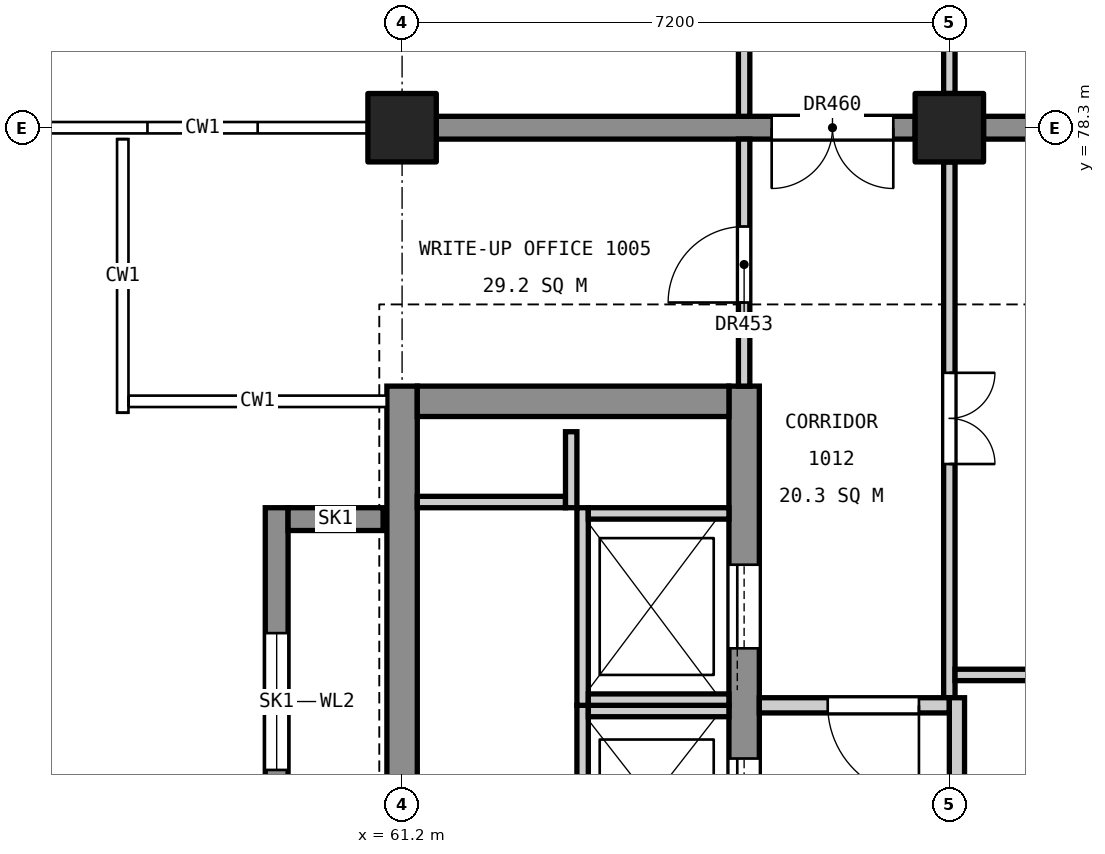
"""IFC4 building model, lengths in metres.
Left out: names, types, materials, properties, quantities, classifications, styles, units other than length and angle.
Written with IfcOpenShell. Run it as: python <this file> out.ifc"""

import sys

from ifc_helpers import new_model, si_unit, direction, frame, frame_2d, origin, origin_2d, place, context, subcontext, project, spatial, rectangle, extrude, element, fill, save


model = new_model("IFC4")
c1 = context("Model", 3, precision=1e-05, world=origin(), true_north=direction((0.0, 1.0)))
c2 = subcontext(c1, "Body", "Model", "MODEL_VIEW")
j1 = project(units=[si_unit("LENGTHUNIT", "METRE"), si_unit("PLANEANGLEUNIT", "RADIAN")], contexts=[c1])
p1 = place(None, origin())
s1 = spatial("IfcSite", under=j1, at=p1, CompositionType="ELEMENT")
p2 = place(p1, origin())
s2 = spatial("IfcBuilding", under=s1, at=p2, CompositionType="ELEMENT")
p3 = place(p2, frame((0.0, 0.0, 51.0)))
s3 = spatial("IfcBuildingStorey", under=s2, at=p3, CompositionType="ELEMENT", Elevation=51.0)
for number, where, z_axis, x_axis in (
    (1, (61.2, 78.3, 0.0), (0.0, 0.0, 1.0), (1.0, 0.0, 0.0)),
    (2, (68.4, 78.3, 0.0), (0.0, 0.0, 1.0), (1.0, 0.0, 0.0)),
):
    element("IfcColumn", number, at=place(p3, frame(where, z_axis=z_axis, x_axis=x_axis)), inside=s3, PredefinedType="COLUMN", context=c2, shape_type="SweptSolid", body=[
        extrude(rectangle(XDim=0.9, YDim=0.9, at=origin_2d()), origin(), (0.0, 0.0, 1.0), 4.8),
    ])
p4 = place(p3, frame((61.2, 60.1, 0.0), z_axis=(0.0, 0.0, 1.0), x_axis=(0.0, 1.0, 0.0)))
e3 = element("IfcWall", 3, at=p4, inside=s3, PredefinedType="SHEAR", context=c2, shape_type="SweptSolid", body=[
    extrude(rectangle(XDim=14.8, YDim=0.4, at=frame_2d((7.4, 0.0))), origin(), (0.0, 0.0, 1.0), 4.55),
])
p5 = place(p4, frame((6.11, 0.0, 3.4)))
e4 = element("IfcOpeningElement", 4, at=p5, cuts=e3, PredefinedType="OPENING", context=c2, shape_type="SweptSolid", body=[
    extrude(rectangle(XDim=1.2, YDim=0.9, at=frame_2d((0.6, 0.45))), frame((0.0, 0.21, 0.0), z_axis=(0.0, -1.0, 0.0), x_axis=(1.0, 0.0, 0.0)), (0.0, 0.0, 1.0), 0.42),
])
p6 = place(p3, frame((65.7, 60.1, 0.0), z_axis=(0.0, 0.0, 1.0), x_axis=(0.0, 1.0, 0.0)))
e5 = element("IfcWall", 5, at=p6, inside=s3, PredefinedType="SHEAR", context=c2, shape_type="SweptSolid", body=[
    extrude(rectangle(XDim=14.8, YDim=0.4, at=frame_2d((7.4, 0.0))), origin(), (0.0, 0.0, 1.0), 4.55),
])
p7 = place(p6, frame((0.5, 0.0, 0.0)))
e6 = element("IfcOpeningElement", 6, at=p7, cuts=e5, PredefinedType="OPENING", context=c2, shape_type="SweptSolid", body=[
    extrude(rectangle(XDim=1.4, YDim=2.1, at=frame_2d((0.7, 1.05))), frame((0.0, 0.21, 0.0), z_axis=(0.0, -1.0, 0.0), x_axis=(1.0, 0.0, 0.0)), (0.0, 0.0, 1.0), 0.42),
])
p8 = place(p6, frame((8.8, 0.0, 0.0)))
e7 = element("IfcOpeningElement", 7, at=p8, cuts=e5, PredefinedType="OPENING", context=c2, shape_type="SweptSolid", body=[
    extrude(rectangle(XDim=1.1, YDim=2.1, at=frame_2d((0.55, 1.05))), frame((0.0, 0.21, 0.0), z_axis=(0.0, -1.0, 0.0), x_axis=(1.0, 0.0, 0.0)), (0.0, 0.0, 1.0), 0.42),
])
p9 = place(p6, frame((11.35, 0.0, 0.0)))
e8 = element("IfcOpeningElement", 8, at=p9, cuts=e5, PredefinedType="OPENING", context=c2, shape_type="SweptSolid", body=[
    extrude(rectangle(XDim=1.1, YDim=2.1, at=frame_2d((0.55, 1.05))), frame((0.0, 0.21, 0.0), z_axis=(0.0, -1.0, 0.0), x_axis=(1.0, 0.0, 0.0)), (0.0, 0.0, 1.0), 0.42),
])
p10 = place(p3, frame((61.4, 74.7, 0.0), z_axis=(0.0, 0.0, 1.0), x_axis=(1.0, 0.0, 0.0)))
e9 = element("IfcWall", 9, at=p10, inside=s3, PredefinedType="SHEAR", context=c2, shape_type="SweptSolid", body=[
    extrude(rectangle(XDim=4.1, YDim=0.4, at=frame_2d((2.05, 0.0))), origin(), (0.0, 0.0, 1.0), 4.55),
])
p11 = place(p3, frame((59.55, 68.2, 0.0), z_axis=(0.0, 0.0, 1.0), x_axis=(0.0, 1.0, 0.0)))
e10 = element("IfcWall", 10, at=p11, inside=s3, PredefinedType="SHEAR", context=c2, shape_type="SweptSolid", body=[
    extrude(rectangle(XDim=5.1, YDim=0.3, at=frame_2d((2.55, 0.0))), origin(), (0.0, 0.0, 1.0), 4.8),
])
p12 = place(p11, frame((1.65, 0.0, 3.0)))
e11 = element("IfcOpeningElement", 11, at=p12, cuts=e10, PredefinedType="OPENING", context=c2, shape_type="SweptSolid", body=[
    extrude(rectangle(XDim=1.8, YDim=1.2, at=frame_2d((0.9, 0.6))), frame((0.0, 0.16, 0.0), z_axis=(0.0, -1.0, 0.0), x_axis=(1.0, 0.0, 0.0)), (0.0, 0.0, 1.0), 0.32),
])
p13 = place(p3, frame((60.95, 73.15, 0.0), z_axis=(0.0, 0.0, 1.0), x_axis=(-1.0, 0.0, 0.0)))
e12 = element("IfcWall", 12, at=p13, inside=s3, PredefinedType="SHEAR", context=c2, shape_type="SweptSolid", body=[
    extrude(rectangle(XDim=1.25, YDim=0.3, at=frame_2d((0.625, 0.0))), origin(), (0.0, 0.0, 1.0), 4.8),
])
p14 = place(p3, frame((61.65, 78.3, 0.0), z_axis=(0.0, 0.0, 1.0), x_axis=(1.0, 0.0, 0.0)))
e13 = element("IfcWall", 13, at=p14, inside=s3, PredefinedType="SHEAR", context=c2, shape_type="SweptSolid", body=[
    extrude(rectangle(XDim=6.3, YDim=0.3, at=frame_2d((3.15, 0.0))), origin(), (0.0, 0.0, 1.0), 4.55),
])
p15 = place(p14, frame((4.413, 0.0, 0.0)))
e14 = element("IfcOpeningElement", 14, at=p15, cuts=e13, PredefinedType="OPENING", context=c2, shape_type="SweptSolid", body=[
    extrude(rectangle(XDim=1.6, YDim=2.1, at=frame_2d((0.8, 1.05))), frame((0.0, 0.16, 0.0), z_axis=(0.0, -1.0, 0.0), x_axis=(1.0, 0.0, 0.0)), (0.0, 0.0, 1.0), 0.32),
])
p16 = place(p3, frame((68.85, 78.3, 0.0), z_axis=(0.0, 0.0, 1.0), x_axis=(1.0, 0.0, 0.0)))
e15 = element("IfcWall", 15, at=p16, inside=s3, PredefinedType="SHEAR", context=c2, shape_type="SweptSolid", body=[
    extrude(rectangle(XDim=9.9, YDim=0.3, at=frame_2d((4.95, 0.0))), origin(), (0.0, 0.0, 1.0), 4.55),
])
p17 = place(p3, frame((63.575, 68.2, 0.0), z_axis=(0.0, 0.0, 1.0), x_axis=(0.0, 1.0, 0.0)))
e16 = element("IfcWall", 16, at=p17, inside=s3, PredefinedType="SOLIDWALL", context=c2, shape_type="SweptSolid", body=[
    extrude(rectangle(XDim=2.5, YDim=0.15, at=frame_2d((1.25, 0.0))), origin(), (0.0, 0.0, 1.0), 4.8),
])
p18 = place(p3, frame((63.65, 70.625, 0.0), z_axis=(0.0, 0.0, 1.0), x_axis=(1.0, 0.0, 0.0)))
e17 = element("IfcWall", 17, at=p18, inside=s3, PredefinedType="SOLIDWALL", context=c2, shape_type="SweptSolid", body=[
    extrude(rectangle(XDim=1.85, YDim=0.15, at=frame_2d((0.925, 0.0))), origin(), (0.0, 0.0, 1.0), 4.8),
])
p19 = place(p3, frame((63.575, 70.7, 0.0), z_axis=(0.0, 0.0, 1.0), x_axis=(0.0, 1.0, 0.0)))
e18 = element("IfcWall", 18, at=p19, inside=s3, PredefinedType="SOLIDWALL", context=c2, shape_type="SweptSolid", body=[
    extrude(rectangle(XDim=2.6, YDim=0.15, at=frame_2d((1.3, 0.0))), origin(), (0.0, 0.0, 1.0), 4.8),
])
for number, where, z_axis, x_axis in (
    (19, (63.65, 70.775, 0.0), (0.0, 0.0, 1.0), (1.0, 0.0, 0.0)),
    (20, (63.65, 73.225, 0.0), (0.0, 0.0, 1.0), (1.0, 0.0, 0.0)),
):
    element("IfcWall", number, at=place(p3, frame(where, z_axis=z_axis, x_axis=x_axis)), inside=s3, PredefinedType="SOLIDWALL", context=c2, shape_type="SweptSolid", body=[
        extrude(rectangle(XDim=1.85, YDim=0.15, at=frame_2d((0.925, 0.0))), origin(), (0.0, 0.0, 1.0), 4.8),
    ])
p20 = place(p3, frame((61.4, 73.375, 0.0), z_axis=(0.0, 0.0, 1.0), x_axis=(1.0, 0.0, 0.0)))
e21 = element("IfcWall", 21, at=p20, inside=s3, PredefinedType="SOLIDWALL", context=c2, shape_type="SweptSolid", body=[
    extrude(rectangle(XDim=1.95, YDim=0.15, at=frame_2d((0.975, 0.0))), origin(), (0.0, 0.0, 1.0), 4.8),
])
p21 = place(p3, frame((63.425, 73.3, 0.0), z_axis=(0.0, 0.0, 1.0), x_axis=(0.0, 1.0, 0.0)))
e22 = element("IfcWall", 22, at=p21, inside=s3, PredefinedType="SOLIDWALL", context=c2, shape_type="SweptSolid", body=[
    extrude(rectangle(XDim=1.0, YDim=0.15, at=frame_2d((0.5, 0.0))), origin(), (0.0, 0.0, 1.0), 4.8),
])
p22 = place(p3, frame((65.7, 74.9, 0.0), z_axis=(0.0, 0.0, 1.0), x_axis=(0.0, 1.0, 0.0)))
e23 = element("IfcWall", 23, at=p22, inside=s3, PredefinedType="PARTITIONING", context=c2, shape_type="SweptSolid", body=[
    extrude(rectangle(XDim=3.25, YDim=0.15, at=frame_2d((1.625, 0.0))), origin(), (0.0, 0.0, 1.0), 3.55),
])
p23 = place(p22, frame((1.1, 0.0, 0.0)))
e24 = element("IfcOpeningElement", 24, at=p23, cuts=e23, PredefinedType="OPENING", context=c2, shape_type="SweptSolid", body=[
    extrude(rectangle(XDim=1.0, YDim=2.1, at=frame_2d((0.5, 1.05))), frame((0.0, 0.085, 0.0), z_axis=(0.0, -1.0, 0.0), x_axis=(1.0, 0.0, 0.0)), (0.0, 0.0, 1.0), 0.17),
])
p24 = place(p3, frame((65.7, 78.45, 0.0), z_axis=(0.0, 0.0, 1.0), x_axis=(0.0, 1.0, 0.0)))
e25 = element("IfcWall", 25, at=p24, inside=s3, PredefinedType="PARTITIONING", context=c2, shape_type="SweptSolid", body=[
    extrude(rectangle(XDim=10.45, YDim=0.15, at=frame_2d((5.225, 0.0))), origin(), (0.0, 0.0, 1.0), 3.55),
])
p25 = place(p24, frame((4.75, 0.0, 0.0)))
e26 = element("IfcOpeningElement", 26, at=p25, cuts=e25, PredefinedType="OPENING", context=c2, shape_type="SweptSolid", body=[
    extrude(rectangle(XDim=1.0, YDim=2.1, at=frame_2d((0.5, 1.05))), frame((0.0, 0.085, 0.0), z_axis=(0.0, -1.0, 0.0), x_axis=(1.0, 0.0, 0.0)), (0.0, 0.0, 1.0), 0.17),
])
p26 = place(p3, frame((68.4, 70.8, 0.0), z_axis=(0.0, 0.0, 1.0), x_axis=(0.0, 1.0, 0.0)))
e27 = element("IfcWall", 27, at=p26, inside=s3, PredefinedType="PARTITIONING", context=c2, shape_type="SweptSolid", body=[
    extrude(rectangle(XDim=7.05, YDim=0.15, at=frame_2d((3.525, 0.0))), origin(), (0.0, 0.0, 1.0), 3.55),
])
p27 = place(p26, frame((3.075, 0.0, 0.0)))
e28 = element("IfcOpeningElement", 28, at=p27, cuts=e27, PredefinedType="OPENING", context=c2, shape_type="SweptSolid", body=[
    extrude(rectangle(XDim=1.2, YDim=2.1, at=frame_2d((0.6, 1.05))), frame((0.0, 0.085, 0.0), z_axis=(0.0, -1.0, 0.0), x_axis=(1.0, 0.0, 0.0)), (0.0, 0.0, 1.0), 0.17),
])
p28 = place(p3, frame((68.4, 78.75, 0.0), z_axis=(0.0, 0.0, 1.0), x_axis=(0.0, 1.0, 0.0)))
e29 = element("IfcWall", 29, at=p28, inside=s3, PredefinedType="PARTITIONING", context=c2, shape_type="SweptSolid", body=[
    extrude(rectangle(XDim=9.9, YDim=0.15, at=frame_2d((4.95, 0.0))), origin(), (0.0, 0.0, 1.0), 3.55),
])
p29 = place(p28, frame((0.975, 0.0, 0.0)))
e30 = element("IfcOpeningElement", 30, at=p29, cuts=e29, PredefinedType="OPENING", context=c2, shape_type="SweptSolid", body=[
    extrude(rectangle(XDim=1.2, YDim=2.1, at=frame_2d((0.6, 1.05))), frame((0.0, 0.085, 0.0), z_axis=(0.0, -1.0, 0.0), x_axis=(1.0, 0.0, 0.0)), (0.0, 0.0, 1.0), 0.17),
])
p30 = place(p28, frame((5.925, 0.0, 0.0)))
e31 = element("IfcOpeningElement", 31, at=p30, cuts=e29, PredefinedType="OPENING", context=c2, shape_type="SweptSolid", body=[
    extrude(rectangle(XDim=1.2, YDim=2.1, at=frame_2d((0.6, 1.05))), frame((0.0, 0.085, 0.0), z_axis=(0.0, -1.0, 0.0), x_axis=(1.0, 0.0, 0.0)), (0.0, 0.0, 1.0), 0.17),
])
p31 = place(p3, frame((65.9, 70.7, 0.0), z_axis=(0.0, 0.0, 1.0), x_axis=(1.0, 0.0, 0.0)))
e32 = element("IfcWall", 32, at=p31, inside=s3, PredefinedType="PARTITIONING", context=c2, shape_type="SweptSolid", body=[
    extrude(rectangle(XDim=2.5, YDim=0.2, at=frame_2d((1.25, 0.0))), origin(), (0.0, 0.0, 1.0), 3.55),
])
p32 = place(p31, frame((0.9, 0.0, 0.0)))
e33 = element("IfcOpeningElement", 33, at=p32, cuts=e32, PredefinedType="OPENING", context=c2, shape_type="SweptSolid", body=[
    extrude(rectangle(XDim=1.2, YDim=2.1, at=frame_2d((0.6, 1.05))), frame((0.0, 0.11, 0.0), z_axis=(0.0, -1.0, 0.0), x_axis=(1.0, 0.0, 0.0)), (0.0, 0.0, 1.0), 0.22),
])
p33 = place(p3, frame((68.5, 67.95, 0.0), z_axis=(0.0, 0.0, 1.0), x_axis=(0.0, 1.0, 0.0)))
e34 = element("IfcWall", 34, at=p33, inside=s3, PredefinedType="PARTITIONING", context=c2, shape_type="SweptSolid", body=[
    extrude(rectangle(XDim=2.85, YDim=0.2, at=frame_2d((1.425, 0.0))), origin(), (0.0, 0.0, 1.0), 3.55),
])
p34 = place(p3, frame((68.475, 71.1, 0.0), z_axis=(0.0, 0.0, 1.0), x_axis=(1.0, 0.0, 0.0)))
e35 = element("IfcWall", 35, at=p34, inside=s3, PredefinedType="PARTITIONING", context=c2, shape_type="SweptSolid", body=[
    extrude(rectangle(XDim=10.575, YDim=0.15, at=frame_2d((5.288, 0.0))), origin(), (0.0, 0.0, 1.0), 3.85),
])
p35 = place(p8, origin())
e36 = element("IfcDoor", 36, at=p35, inside=s3, OperationType="SLIDING_TO_LEFT", PredefinedType="DOOR", context=c2, shape_type="SweptSolid", body=[
    extrude(rectangle(XDim=1.1, YDim=2.1, at=frame_2d((0.55, 1.05))), frame((0.0, 0.025, 0.0), z_axis=(0.0, -1.0, 0.0), x_axis=(1.0, 0.0, 0.0)), (0.0, 0.0, 1.0), 0.05),
])
fill(e7, e36)
p36 = place(p9, origin())
e37 = element("IfcDoor", 37, at=p36, inside=s3, OperationType="SLIDING_TO_LEFT", PredefinedType="DOOR", context=c2, shape_type="SweptSolid", body=[
    extrude(rectangle(XDim=1.1, YDim=2.1, at=frame_2d((0.55, 1.05))), frame((0.0, 0.025, 0.0), z_axis=(0.0, -1.0, 0.0), x_axis=(1.0, 0.0, 0.0)), (0.0, 0.0, 1.0), 0.05),
])
fill(e8, e37)
p37 = place(p12, origin())
e38 = element("IfcWindow", 38, at=p37, inside=s3, PartitioningType="SINGLE_PANEL", PredefinedType="WINDOW", context=c2, shape_type="SweptSolid", body=[
    extrude(rectangle(XDim=1.8, YDim=1.2, at=frame_2d((0.9, 0.6))), frame((0.0, 0.03, 0.0), z_axis=(0.0, -1.0, 0.0), x_axis=(1.0, 0.0, 0.0)), (0.0, 0.0, 1.0), 0.06),
])
fill(e11, e38)
p38 = place(p27, frame((1.2, 0.0, 0.0), z_axis=(0.0, 0.0, 1.0), x_axis=(-1.0, 0.0, 0.0)))
e39 = element("IfcDoor", 39, at=p38, inside=s3, OperationType="DOUBLE_DOOR_SINGLE_SWING", PredefinedType="DOOR", context=c2, shape_type="SweptSolid", body=[
    extrude(rectangle(XDim=1.2, YDim=2.1, at=frame_2d((0.6, 1.05))), frame((0.0, 0.025, 0.0), z_axis=(0.0, -1.0, 0.0), x_axis=(1.0, 0.0, 0.0)), (0.0, 0.0, 1.0), 0.05),
])
fill(e28, e39)
p39 = place(p23, origin())
e40 = element("IfcDoor", 40, at=p39, inside=s3, OperationType="SINGLE_SWING_LEFT", PredefinedType="DOOR", context=c2, shape_type="SweptSolid", body=[
    extrude(rectangle(XDim=1.0, YDim=2.1, at=frame_2d((0.5, 1.05))), frame((0.0, 0.025, 0.0), z_axis=(0.0, -1.0, 0.0), x_axis=(1.0, 0.0, 0.0)), (0.0, 0.0, 1.0), 0.05),
])
fill(e24, e40)
p40 = place(p32, frame((1.2, 0.0, 0.0), z_axis=(0.0, 0.0, 1.0), x_axis=(-1.0, 0.0, 0.0)))
e41 = element("IfcDoor", 41, at=p40, inside=s3, OperationType="SINGLE_SWING_LEFT", PredefinedType="DOOR", context=c2, shape_type="SweptSolid", body=[
    extrude(rectangle(XDim=1.2, YDim=2.1, at=frame_2d((0.6, 1.05))), frame((0.0, 0.025, 0.0), z_axis=(0.0, -1.0, 0.0), x_axis=(1.0, 0.0, 0.0)), (0.0, 0.0, 1.0), 0.05),
])
fill(e33, e41)
p41 = place(p15, frame((1.6, 0.0, 0.0), z_axis=(0.0, 0.0, 1.0), x_axis=(-1.0, 0.0, 0.0)))
e42 = element("IfcDoor", 42, at=p41, inside=s3, OperationType="DOUBLE_DOOR_SINGLE_SWING", PredefinedType="DOOR", context=c2, shape_type="SweptSolid", body=[
    extrude(rectangle(XDim=1.6, YDim=2.1, at=frame_2d((0.8, 1.05))), frame((0.0, 0.025, 0.0), z_axis=(0.0, -1.0, 0.0), x_axis=(1.0, 0.0, 0.0)), (0.0, 0.0, 1.0), 0.05),
])
fill(e14, e42)
save(model, sys.argv[1])
